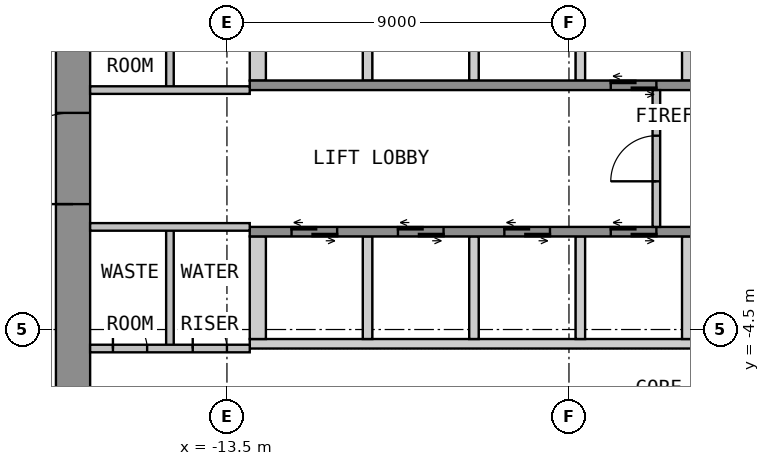
"""IFC4 building model, lengths in metres.
Left out: names, types, materials, properties, quantities, classifications, styles, units other than length and angle.
Written with IfcOpenShell. Run it as: python <this file> out.ifc"""

import sys

from ifc_helpers import new_model, si_unit, direction, frame, frame_2d, origin, place, context, subcontext, project, spatial, polyline, rectangle, outline, extrude, element, fill, save


model = new_model("IFC4")
c1 = context("Model", 3, precision=1e-05, world=origin(), true_north=direction((0.0, 1.0)))
c2 = subcontext(c1, "Body", "Model", "MODEL_VIEW")
j1 = project(units=[si_unit("LENGTHUNIT", "METRE"), si_unit("PLANEANGLEUNIT", "RADIAN")], contexts=[c1])
p1 = place(None, origin())
s1 = spatial("IfcSite", under=j1, at=p1, CompositionType="ELEMENT")
p2 = place(p1, origin())
s2 = spatial("IfcBuilding", under=s1, at=p2, CompositionType="ELEMENT")
p3 = place(p2, frame((0.0, 0.0, 81.3)))
s3 = spatial("IfcBuildingStorey", under=s2, at=p3, CompositionType="ELEMENT", Elevation=81.3)
p4 = place(p3, frame((-17.55, -12.6, 0.0), z_axis=(0.0, 0.0, 1.0), x_axis=(0.0, 1.0, 0.0)))
e1 = element("IfcWall", 1, at=p4, inside=s3, PredefinedType="SHEAR", context=c2, shape_type="SweptSolid", body=[
    extrude(rectangle(XDim=25.2, YDim=0.9, at=frame_2d((12.6, 0.0))), origin(), (0.0, 0.0, 1.0), 3.525),
])
p5 = place(p4, frame((11.4, 0.0, 0.0)))
e2 = element("IfcOpeningElement", 2, at=p5, cuts=e1, PredefinedType="OPENING", context=c2, shape_type="SweptSolid", body=[
    extrude(rectangle(XDim=2.4, YDim=2.1, at=frame_2d((1.2, 1.05))), frame((0.0, 0.46, 0.0), z_axis=(0.0, -1.0, 0.0), x_axis=(1.0, 0.0, 0.0)), (0.0, 0.0, 1.0), 0.92),
])
p6 = place(p3, origin())
e3 = element("IfcWall", 3, at=p6, inside=s3, PredefinedType="SHEAR", context=c2, shape_type="SweptSolid", body=[
    extrude(outline(polyline([(-12.9, 2.05), (-12.475, 2.05), (-12.475, 4.75), (-12.9, 4.75), (-12.9, 2.05)])), origin(), (0.0, 0.0, 1.0), 3.525),
])
p7 = place(p3, origin())
e4 = element("IfcWall", 4, at=p7, inside=s3, PredefinedType="SHEAR", context=c2, shape_type="SweptSolid", body=[
    extrude(outline(polyline([(-9.925, 2.05), (-9.675, 2.05), (-9.675, 4.75), (-9.925, 4.75), (-9.925, 2.05)])), origin(), (0.0, 0.0, 1.0), 3.525),
])
p8 = place(p3, origin())
e5 = element("IfcWall", 5, at=p8, inside=s3, PredefinedType="SHEAR", context=c2, shape_type="SweptSolid", body=[
    extrude(outline(polyline([(-7.125, 2.05), (-6.875, 2.05), (-6.875, 4.75), (-7.125, 4.75), (-7.125, 2.05)])), origin(), (0.0, 0.0, 1.0), 3.525),
])
p9 = place(p3, origin())
e6 = element("IfcWall", 6, at=p9, inside=s3, PredefinedType="SHEAR", context=c2, shape_type="SweptSolid", body=[
    extrude(outline(polyline([(-4.325, 2.05), (-4.075, 2.05), (-4.075, 4.75), (-4.325, 4.75), (-4.325, 2.05)])), origin(), (0.0, 0.0, 1.0), 3.525),
])
p10 = place(p3, origin())
e7 = element("IfcWall", 7, at=p10, inside=s3, PredefinedType="SHEAR", context=c2, shape_type="SweptSolid", body=[
    extrude(outline(polyline([(-1.525, 2.05), (-1.275, 2.05), (-1.275, 4.75), (-1.525, 4.75), (-1.525, 2.05)])), origin(), (0.0, 0.0, 1.0), 3.525),
])
p11 = place(p3, frame((-12.9, 1.925, 0.0), z_axis=(0.0, 0.0, 1.0), x_axis=(1.0, 0.0, 0.0)))
e8 = element("IfcWall", 8, at=p11, inside=s3, PredefinedType="SHEAR", context=c2, shape_type="SweptSolid", body=[
    extrude(rectangle(XDim=25.8, YDim=0.25, at=frame_2d((12.9, 0.0))), origin(), (0.0, 0.0, 1.0), 3.525),
])
p12 = place(p11, frame((9.5, 0.0, 0.0)))
e9 = element("IfcOpeningElement", 9, at=p12, cuts=e8, PredefinedType="OPENING", context=c2, shape_type="SweptSolid", body=[
    extrude(rectangle(XDim=1.2, YDim=2.1, at=frame_2d((0.6, 1.05))), frame((0.0, 0.135, 0.0), z_axis=(0.0, -1.0, 0.0), x_axis=(1.0, 0.0, 0.0)), (0.0, 0.0, 1.0), 0.27),
])
p13 = place(p11, frame((12.3, 0.0, 0.0)))
e10 = element("IfcOpeningElement", 10, at=p13, cuts=e8, PredefinedType="OPENING", context=c2, shape_type="SweptSolid", body=[
    extrude(rectangle(XDim=1.2, YDim=2.1, at=frame_2d((0.6, 1.05))), frame((0.0, 0.135, 0.0), z_axis=(0.0, -1.0, 0.0), x_axis=(1.0, 0.0, 0.0)), (0.0, 0.0, 1.0), 0.27),
])
p14 = place(p11, frame((15.1, 0.0, 0.0)))
e11 = element("IfcOpeningElement", 11, at=p14, cuts=e8, PredefinedType="OPENING", context=c2, shape_type="SweptSolid", body=[
    extrude(rectangle(XDim=1.2, YDim=2.1, at=frame_2d((0.6, 1.05))), frame((0.0, 0.135, 0.0), z_axis=(0.0, -1.0, 0.0), x_axis=(1.0, 0.0, 0.0)), (0.0, 0.0, 1.0), 0.27),
])
p15 = place(p11, frame((17.9, 0.0, 0.0)))
e12 = element("IfcOpeningElement", 12, at=p15, cuts=e8, PredefinedType="OPENING", context=c2, shape_type="SweptSolid", body=[
    extrude(rectangle(XDim=1.2, YDim=2.1, at=frame_2d((0.6, 1.05))), frame((0.0, 0.135, 0.0), z_axis=(0.0, -1.0, 0.0), x_axis=(1.0, 0.0, 0.0)), (0.0, 0.0, 1.0), 0.27),
])
p16 = place(p11, frame((20.7, 0.0, 0.0)))
e13 = element("IfcOpeningElement", 13, at=p16, cuts=e8, PredefinedType="OPENING", context=c2, shape_type="SweptSolid", body=[
    extrude(rectangle(XDim=1.2, YDim=2.1, at=frame_2d((0.6, 1.05))), frame((0.0, 0.135, 0.0), z_axis=(0.0, -1.0, 0.0), x_axis=(1.0, 0.0, 0.0)), (0.0, 0.0, 1.0), 0.27),
])
p17 = place(p11, frame((23.5, 0.0, 0.0)))
e14 = element("IfcOpeningElement", 14, at=p17, cuts=e8, PredefinedType="OPENING", context=c2, shape_type="SweptSolid", body=[
    extrude(rectangle(XDim=1.2, YDim=2.1, at=frame_2d((0.6, 1.05))), frame((0.0, 0.135, 0.0), z_axis=(0.0, -1.0, 0.0), x_axis=(1.0, 0.0, 0.0)), (0.0, 0.0, 1.0), 0.27),
])
p18 = place(p3, origin())
e15 = element("IfcWall", 15, at=p18, inside=s3, PredefinedType="SHEAR", context=c2, shape_type="SweptSolid", body=[
    extrude(outline(polyline([(-12.9, -5.0), (12.9, -5.0), (12.9, -4.75), (-12.9, -4.75), (-12.9, -5.0)])), origin(), (0.0, 0.0, 1.0), 3.525),
])
p19 = place(p3, origin())
e16 = element("IfcWall", 16, at=p19, inside=s3, PredefinedType="SHEAR", context=c2, shape_type="SweptSolid", body=[
    extrude(outline(polyline([(-12.9, -4.75), (-12.475, -4.75), (-12.475, -2.05), (-12.9, -2.05), (-12.9, -4.75)])), origin(), (0.0, 0.0, 1.0), 3.525),
])
p20 = place(p3, origin())
e17 = element("IfcWall", 17, at=p20, inside=s3, PredefinedType="SHEAR", context=c2, shape_type="SweptSolid", body=[
    extrude(outline(polyline([(-9.925, -4.75), (-9.675, -4.75), (-9.675, -2.05), (-9.925, -2.05), (-9.925, -4.75)])), origin(), (0.0, 0.0, 1.0), 3.525),
])
p21 = place(p3, origin())
e18 = element("IfcWall", 18, at=p21, inside=s3, PredefinedType="SHEAR", context=c2, shape_type="SweptSolid", body=[
    extrude(outline(polyline([(-7.125, -4.75), (-6.875, -4.75), (-6.875, -2.05), (-7.125, -2.05), (-7.125, -4.75)])), origin(), (0.0, 0.0, 1.0), 3.525),
])
p22 = place(p3, origin())
e19 = element("IfcWall", 19, at=p22, inside=s3, PredefinedType="SHEAR", context=c2, shape_type="SweptSolid", body=[
    extrude(outline(polyline([(-4.325, -4.75), (-4.075, -4.75), (-4.075, -2.05), (-4.325, -2.05), (-4.325, -4.75)])), origin(), (0.0, 0.0, 1.0), 3.525),
])
p23 = place(p3, origin())
e20 = element("IfcWall", 20, at=p23, inside=s3, PredefinedType="SHEAR", context=c2, shape_type="SweptSolid", body=[
    extrude(outline(polyline([(-1.525, -4.75), (-1.275, -4.75), (-1.275, -2.05), (-1.525, -2.05), (-1.525, -4.75)])), origin(), (0.0, 0.0, 1.0), 3.525),
])
p24 = place(p3, frame((-12.9, -1.925, 0.0), z_axis=(0.0, 0.0, 1.0), x_axis=(1.0, 0.0, 0.0)))
e21 = element("IfcWall", 21, at=p24, inside=s3, PredefinedType="SHEAR", context=c2, shape_type="SweptSolid", body=[
    extrude(rectangle(XDim=25.8, YDim=0.25, at=frame_2d((12.9, 0.0))), origin(), (0.0, 0.0, 1.0), 3.525),
])
p25 = place(p24, frame((1.1, 0.0, 0.0)))
e22 = element("IfcOpeningElement", 22, at=p25, cuts=e21, PredefinedType="OPENING", context=c2, shape_type="SweptSolid", body=[
    extrude(rectangle(XDim=1.2, YDim=2.1, at=frame_2d((0.6, 1.05))), frame((0.0, 0.135, 0.0), z_axis=(0.0, -1.0, 0.0), x_axis=(1.0, 0.0, 0.0)), (0.0, 0.0, 1.0), 0.27),
])
p26 = place(p24, frame((3.9, 0.0, 0.0)))
e23 = element("IfcOpeningElement", 23, at=p26, cuts=e21, PredefinedType="OPENING", context=c2, shape_type="SweptSolid", body=[
    extrude(rectangle(XDim=1.2, YDim=2.1, at=frame_2d((0.6, 1.05))), frame((0.0, 0.135, 0.0), z_axis=(0.0, -1.0, 0.0), x_axis=(1.0, 0.0, 0.0)), (0.0, 0.0, 1.0), 0.27),
])
p27 = place(p24, frame((6.7, 0.0, 0.0)))
e24 = element("IfcOpeningElement", 24, at=p27, cuts=e21, PredefinedType="OPENING", context=c2, shape_type="SweptSolid", body=[
    extrude(rectangle(XDim=1.2, YDim=2.1, at=frame_2d((0.6, 1.05))), frame((0.0, 0.135, 0.0), z_axis=(0.0, -1.0, 0.0), x_axis=(1.0, 0.0, 0.0)), (0.0, 0.0, 1.0), 0.27),
])
p28 = place(p24, frame((9.5, 0.0, 0.0)))
e25 = element("IfcOpeningElement", 25, at=p28, cuts=e21, PredefinedType="OPENING", context=c2, shape_type="SweptSolid", body=[
    extrude(rectangle(XDim=1.2, YDim=2.1, at=frame_2d((0.6, 1.05))), frame((0.0, 0.135, 0.0), z_axis=(0.0, -1.0, 0.0), x_axis=(1.0, 0.0, 0.0)), (0.0, 0.0, 1.0), 0.27),
])
p29 = place(p24, frame((12.3, 0.0, 0.0)))
e26 = element("IfcOpeningElement", 26, at=p29, cuts=e21, PredefinedType="OPENING", context=c2, shape_type="SweptSolid", body=[
    extrude(rectangle(XDim=1.2, YDim=2.1, at=frame_2d((0.6, 1.05))), frame((0.0, 0.135, 0.0), z_axis=(0.0, -1.0, 0.0), x_axis=(1.0, 0.0, 0.0)), (0.0, 0.0, 1.0), 0.27),
])
p30 = place(p24, frame((15.1, 0.0, 0.0)))
e27 = element("IfcOpeningElement", 27, at=p30, cuts=e21, PredefinedType="OPENING", context=c2, shape_type="SweptSolid", body=[
    extrude(rectangle(XDim=1.2, YDim=2.1, at=frame_2d((0.6, 1.05))), frame((0.0, 0.135, 0.0), z_axis=(0.0, -1.0, 0.0), x_axis=(1.0, 0.0, 0.0)), (0.0, 0.0, 1.0), 0.27),
])
p31 = place(p3, frame((-2.2, -1.8, 0.0), z_axis=(0.0, 0.0, 1.0), x_axis=(0.0, 1.0, 0.0)))
e28 = element("IfcWall", 28, at=p31, inside=s3, PredefinedType="PARTITIONING", context=c2, shape_type="SweptSolid", body=[
    extrude(rectangle(XDim=3.6, YDim=0.2, at=frame_2d((1.8, 0.0))), origin(), (0.0, 0.0, 1.0), 3.525),
])
p32 = place(p31, frame((1.2, 0.0, 0.0)))
e29 = element("IfcOpeningElement", 29, at=p32, cuts=e28, PredefinedType="OPENING", context=c2, shape_type="SweptSolid", body=[
    extrude(rectangle(XDim=1.2, YDim=2.1, at=frame_2d((0.6, 1.05))), frame((0.0, 0.11, 0.0), z_axis=(0.0, -1.0, 0.0), x_axis=(1.0, 0.0, 0.0)), (0.0, 0.0, 1.0), 0.22),
])
p33 = place(p3, frame((-15.0, 1.8, 0.0), z_axis=(0.0, 0.0, 1.0), x_axis=(0.0, 1.0, 0.0)))
e30 = element("IfcWall", 30, at=p33, inside=s3, PredefinedType="PARTITIONING", context=c2, shape_type="SweptSolid", body=[
    extrude(rectangle(XDim=3.2, YDim=0.2, at=frame_2d((1.6, 0.0))), origin(), (0.0, 0.0, 1.0), 3.525),
])
p34 = place(p3, frame((-17.1, 1.8, 0.0), z_axis=(0.0, 0.0, 1.0), x_axis=(1.0, 0.0, 0.0)))
e31 = element("IfcWall", 31, at=p34, inside=s3, PredefinedType="PARTITIONING", context=c2, shape_type="SweptSolid", body=[
    extrude(rectangle(XDim=4.2, YDim=0.2, at=frame_2d((2.1, 0.0))), origin(), (0.0, 0.0, 1.0), 3.525),
])
p35 = place(p3, frame((-15.0, -5.0, 0.0), z_axis=(0.0, 0.0, 1.0), x_axis=(0.0, 1.0, 0.0)))
e32 = element("IfcWall", 32, at=p35, inside=s3, PredefinedType="PARTITIONING", context=c2, shape_type="SweptSolid", body=[
    extrude(rectangle(XDim=3.2, YDim=0.2, at=frame_2d((1.6, 0.0))), origin(), (0.0, 0.0, 1.0), 3.525),
])
p36 = place(p3, frame((-17.1, -5.0, 0.0), z_axis=(0.0, 0.0, 1.0), x_axis=(1.0, 0.0, 0.0)))
e33 = element("IfcWall", 33, at=p36, inside=s3, PredefinedType="PARTITIONING", context=c2, shape_type="SweptSolid", body=[
    extrude(rectangle(XDim=4.2, YDim=0.2, at=frame_2d((2.1, 0.0))), origin(), (0.0, 0.0, 1.0), 3.525),
])
p37 = place(p36, frame((0.6, 0.0, 0.0)))
e34 = element("IfcOpeningElement", 34, at=p37, cuts=e33, PredefinedType="OPENING", context=c2, shape_type="SweptSolid", body=[
    extrude(rectangle(XDim=0.9, YDim=2.1, at=frame_2d((0.45, 1.05))), frame((0.0, 0.11, 0.0), z_axis=(0.0, -1.0, 0.0), x_axis=(1.0, 0.0, 0.0)), (0.0, 0.0, 1.0), 0.22),
])
p38 = place(p36, frame((2.7, 0.0, 0.0)))
e35 = element("IfcOpeningElement", 35, at=p38, cuts=e33, PredefinedType="OPENING", context=c2, shape_type="SweptSolid", body=[
    extrude(rectangle(XDim=0.9, YDim=2.1, at=frame_2d((0.45, 1.05))), frame((0.0, 0.11, 0.0), z_axis=(0.0, -1.0, 0.0), x_axis=(1.0, 0.0, 0.0)), (0.0, 0.0, 1.0), 0.22),
])
p39 = place(p3, frame((-17.1, -1.8, 0.0), z_axis=(0.0, 0.0, 1.0), x_axis=(1.0, 0.0, 0.0)))
e36 = element("IfcWall", 36, at=p39, inside=s3, PredefinedType="PARTITIONING", context=c2, shape_type="SweptSolid", body=[
    extrude(rectangle(XDim=4.2, YDim=0.2, at=frame_2d((2.1, 0.0))), origin(), (0.0, 0.0, 1.0), 3.525),
])
p40 = place(p5, origin())
e37 = element("IfcDoor", 37, at=p40, inside=s3, OperationType="DOUBLE_DOOR_DOUBLE_SWING", PredefinedType="DOOR", context=c2, shape_type="SweptSolid", body=[
    extrude(rectangle(XDim=2.4, YDim=2.1, at=frame_2d((1.2, 1.05))), frame((0.0, 0.025, 0.0), z_axis=(0.0, -1.0, 0.0), x_axis=(1.0, 0.0, 0.0)), (0.0, 0.0, 1.0), 0.05),
])
fill(e2, e37)
p41 = place(p12, origin())
e38 = element("IfcDoor", 38, at=p41, inside=s3, OperationType="DOUBLE_DOOR_SLIDING", PredefinedType="DOOR", context=c2, shape_type="SweptSolid", body=[
    extrude(rectangle(XDim=1.2, YDim=2.1, at=frame_2d((0.6, 1.05))), frame((0.0, 0.025, 0.0), z_axis=(0.0, -1.0, 0.0), x_axis=(1.0, 0.0, 0.0)), (0.0, 0.0, 1.0), 0.05),
])
fill(e9, e38)
p42 = place(p25, origin())
e39 = element("IfcDoor", 39, at=p42, inside=s3, OperationType="DOUBLE_DOOR_SLIDING", PredefinedType="DOOR", context=c2, shape_type="SweptSolid", body=[
    extrude(rectangle(XDim=1.2, YDim=2.1, at=frame_2d((0.6, 1.05))), frame((0.0, 0.025, 0.0), z_axis=(0.0, -1.0, 0.0), x_axis=(1.0, 0.0, 0.0)), (0.0, 0.0, 1.0), 0.05),
])
fill(e22, e39)
p43 = place(p26, origin())
e40 = element("IfcDoor", 40, at=p43, inside=s3, OperationType="DOUBLE_DOOR_SLIDING", PredefinedType="DOOR", context=c2, shape_type="SweptSolid", body=[
    extrude(rectangle(XDim=1.2, YDim=2.1, at=frame_2d((0.6, 1.05))), frame((0.0, 0.025, 0.0), z_axis=(0.0, -1.0, 0.0), x_axis=(1.0, 0.0, 0.0)), (0.0, 0.0, 1.0), 0.05),
])
fill(e23, e40)
p44 = place(p27, origin())
e41 = element("IfcDoor", 41, at=p44, inside=s3, OperationType="DOUBLE_DOOR_SLIDING", PredefinedType="DOOR", context=c2, shape_type="SweptSolid", body=[
    extrude(rectangle(XDim=1.2, YDim=2.1, at=frame_2d((0.6, 1.05))), frame((0.0, 0.025, 0.0), z_axis=(0.0, -1.0, 0.0), x_axis=(1.0, 0.0, 0.0)), (0.0, 0.0, 1.0), 0.05),
])
fill(e24, e41)
p45 = place(p28, origin())
e42 = element("IfcDoor", 42, at=p45, inside=s3, OperationType="DOUBLE_DOOR_SLIDING", PredefinedType="DOOR", context=c2, shape_type="SweptSolid", body=[
    extrude(rectangle(XDim=1.2, YDim=2.1, at=frame_2d((0.6, 1.05))), frame((0.0, 0.025, 0.0), z_axis=(0.0, -1.0, 0.0), x_axis=(1.0, 0.0, 0.0)), (0.0, 0.0, 1.0), 0.05),
])
fill(e25, e42)
p46 = place(p32, origin())
e43 = element("IfcDoor", 43, at=p46, inside=s3, OperationType="SINGLE_SWING_LEFT", PredefinedType="DOOR", context=c2, shape_type="SweptSolid", body=[
    extrude(rectangle(XDim=1.2, YDim=2.1, at=frame_2d((0.6, 1.05))), frame((0.0, 0.025, 0.0), z_axis=(0.0, -1.0, 0.0), x_axis=(1.0, 0.0, 0.0)), (0.0, 0.0, 1.0), 0.05),
])
fill(e29, e43)
p47 = place(p37, origin())
e44 = element("IfcDoor", 44, at=p47, inside=s3, OperationType="SINGLE_SWING_LEFT", PredefinedType="DOOR", context=c2, shape_type="SweptSolid", body=[
    extrude(rectangle(XDim=0.9, YDim=2.1, at=frame_2d((0.45, 1.05))), frame((0.0, 0.025, 0.0), z_axis=(0.0, -1.0, 0.0), x_axis=(1.0, 0.0, 0.0)), (0.0, 0.0, 1.0), 0.05),
])
fill(e34, e44)
p48 = place(p38, origin())
e45 = element("IfcDoor", 45, at=p48, inside=s3, OperationType="SINGLE_SWING_LEFT", PredefinedType="DOOR", context=c2, shape_type="SweptSolid", body=[
    extrude(rectangle(XDim=0.9, YDim=2.1, at=frame_2d((0.45, 1.05))), frame((0.0, 0.025, 0.0), z_axis=(0.0, -1.0, 0.0), x_axis=(1.0, 0.0, 0.0)), (0.0, 0.0, 1.0), 0.05),
])
fill(e35, e45)
save(model, sys.argv[1])
